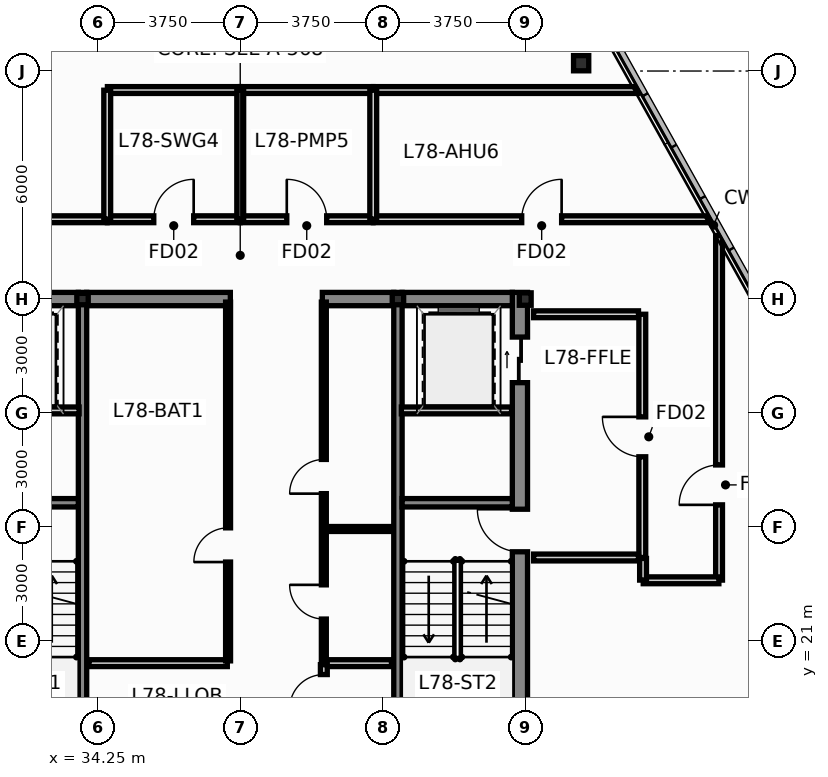
"""IFC4 building model, lengths in metres.
Left out: names, types, materials, properties, quantities, classifications, styles, units other than length and angle.
Written with IfcOpenShell. Run it as: python <this file> out.ifc"""

import sys

from ifc_helpers import new_model, si_unit, direction, frame, frame_2d, origin, origin_2d, place, context, subcontext, project, spatial, rectangle, hollow_rectangle, i_section, extrude, source, transform, mapped, element, fill, save


model = new_model("IFC4")
c1 = context("Model", 3, precision=1e-05, world=origin(), true_north=direction((0.0, 1.0)))
c2 = subcontext(c1, "Body", "Model", "MODEL_VIEW")
j1 = project(units=[si_unit("LENGTHUNIT", "METRE"), si_unit("PLANEANGLEUNIT", "RADIAN")], contexts=[c1])
p1 = place(None, origin())
s1 = spatial("IfcSite", under=j1, at=p1, CompositionType="ELEMENT")
p2 = place(p1, origin())
s2 = spatial("IfcBuilding", under=s1, at=p2, CompositionType="ELEMENT")
p3 = place(p2, frame((0.0, 0.0, 296.6)))
s3 = spatial("IfcBuildingStorey", under=s2, at=p3, CompositionType="ELEMENT", Elevation=296.6)
m1 = source(origin(), c2, "Body", "SweptSolid", [
    extrude(i_section(OverallWidth=0.311, OverallDepth=0.327, WebThickness=0.016, FlangeThickness=0.025, at=origin_2d()), origin(), (0.0, 0.0, 1.0), 3.4),
])
p4 = place(p3, frame((45.5, 30.0, 0.0), z_axis=(0.0, 0.0, 1.0), x_axis=(1.0, 0.0, 0.0)))
e1 = element("IfcColumn", 1, at=p4, inside=s3, PredefinedType="COLUMN", context=c2, shape_type="MappedRepresentation", body=[
    mapped(m1, transform((0.0, 0.0, 0.0), scale=1.0)),
])
m2 = source(origin(), c2, "Body", "SweptSolid", [
    extrude(hollow_rectangle(XDim=0.3, YDim=0.3, WallThickness=0.012, at=origin_2d()), origin(), (0.0, 0.0, 1.0), 3.4),
])
for number, where, z_axis, x_axis in (
    (2, (33.85, 30.0, 0.0), (0.0, 0.0, 1.0), (1.0, 0.0, 0.0)),
    (3, (42.15, 30.0, 0.0), (0.0, 0.0, 1.0), (1.0, 0.0, 0.0)),
):
    element("IfcColumn", number, at=place(p3, frame(where, z_axis=z_axis, x_axis=x_axis)), inside=s3, PredefinedType="COLUMN", context=c2, shape_type="MappedRepresentation", body=[
        mapped(m2, transform((0.0, 0.0, 0.0), scale=1.0)),
    ])
p5 = place(p3, frame((45.36, 17.05, 0.0), z_axis=(0.0, 0.0, 1.0), x_axis=(0.0, 1.0, 0.0)))
e4 = element("IfcWall", 4, at=p5, inside=s3, PredefinedType="SHEAR", context=c2, shape_type="SweptSolid", body=[
    extrude(rectangle(XDim=13.125, YDim=0.4, at=frame_2d((6.562, 0.0))), origin(), (0.0, 0.0, 1.0), 3.4),
])
p6 = place(p5, frame((6.3, 0.0, 0.0)))
e5 = element("IfcOpeningElement", 5, at=p6, cuts=e4, PredefinedType="OPENING", context=c2, shape_type="SweptSolid", body=[
    extrude(rectangle(XDim=1.12, YDim=2.15, at=frame_2d((0.56, 1.075))), frame((0.0, 0.212, 0.0), z_axis=(0.0, -1.0, 0.0), x_axis=(1.0, 0.0, 0.0)), (0.0, 0.0, 1.0), 0.424),
])
p7 = place(p5, frame((10.75, 0.0, 0.0)))
e6 = element("IfcOpeningElement", 6, at=p7, cuts=e4, PredefinedType="OPENING", context=c2, shape_type="SweptSolid", body=[
    extrude(rectangle(XDim=1.2, YDim=2.2, at=frame_2d((0.6, 1.1))), frame((0.0, 0.212, 0.0), z_axis=(0.0, -1.0, 0.0), x_axis=(1.0, 0.0, 0.0)), (0.0, 0.0, 1.0), 0.424),
])
p8 = place(p3, frame((30.84, 30.0, 0.0), z_axis=(0.0, 0.0, 1.0), x_axis=(1.0, 0.0, 0.0)))
e7 = element("IfcWall", 7, at=p8, inside=s3, PredefinedType="SHEAR", context=c2, shape_type="SweptSolid", body=[
    extrude(rectangle(XDim=2.9, YDim=0.35, at=frame_2d((1.45, 0.0))), origin(), (0.0, 0.0, 1.0), 3.4),
])
p9 = place(p3, frame((33.96, 30.0, 0.0), z_axis=(0.0, 0.0, 1.0), x_axis=(1.0, 0.0, 0.0)))
e8 = element("IfcWall", 8, at=p9, inside=s3, PredefinedType="SHEAR", context=c2, shape_type="SweptSolid", body=[
    extrude(rectangle(XDim=3.78, YDim=0.35, at=frame_2d((1.89, 0.0))), origin(), (0.0, 0.0, 1.0), 3.4),
])
p10 = place(p3, frame((40.16, 30.0, 0.0), z_axis=(0.0, 0.0, 1.0), x_axis=(1.0, 0.0, 0.0)))
e9 = element("IfcWall", 9, at=p10, inside=s3, PredefinedType="SHEAR", context=c2, shape_type="SweptSolid", body=[
    extrude(rectangle(XDim=1.88, YDim=0.35, at=frame_2d((0.94, 0.0))), origin(), (0.0, 0.0, 1.0), 3.4),
])
p11 = place(p3, frame((42.26, 30.0, 0.0), z_axis=(0.0, 0.0, 1.0), x_axis=(1.0, 0.0, 0.0)))
e10 = element("IfcWall", 10, at=p11, inside=s3, PredefinedType="SHEAR", context=c2, shape_type="SweptSolid", body=[
    extrude(rectangle(XDim=2.9, YDim=0.35, at=frame_2d((1.45, 0.0))), origin(), (0.0, 0.0, 1.0), 3.4),
])
for number, where, z_axis, x_axis in (
    (11, (33.85, 17.05, 0.0), (0.0, 0.0, 1.0), (0.0, 1.0, 0.0)),
    (12, (42.15, 17.05, 0.0), (0.0, 0.0, 1.0), (0.0, 1.0, 0.0)),
):
    element("IfcWall", number, at=place(p3, frame(where, z_axis=z_axis, x_axis=x_axis)), inside=s3, PredefinedType="SHEAR", context=c2, shape_type="SweptSolid", body=[
        extrude(rectangle(XDim=13.125, YDim=0.22, at=frame_2d((6.562, 0.0))), origin(), (0.0, 0.0, 1.0), 3.4),
    ])
for number, where, z_axis, x_axis in (
    (13, (30.84, 24.64, 0.0), (0.0, 0.0, 1.0), (1.0, 0.0, 0.0)),
    (14, (42.26, 24.64, 0.0), (0.0, 0.0, 1.0), (1.0, 0.0, 0.0)),
):
    element("IfcWall", number, at=place(p3, frame(where, z_axis=z_axis, x_axis=x_axis)), inside=s3, PredefinedType="SHEAR", context=c2, shape_type="SweptSolid", body=[
        extrude(rectangle(XDim=2.9, YDim=0.22, at=frame_2d((1.45, 0.0))), origin(), (0.0, 0.0, 1.0), 3.4),
    ])
m3 = source(origin(), c2, "Body", "SweptSolid", [
    extrude(hollow_rectangle(XDim=0.4, YDim=0.4, WallThickness=0.016, at=origin_2d()), origin(), (0.0, 0.0, 1.0), 3.401),
])
p12 = place(p3, frame((46.971, 36.206, 0.0), z_axis=(-0.019384199241, -0.006030639764, 0.999793920868), x_axis=(0.297066552636, -0.954856776331, 0.0)))
e15 = element("IfcColumn", 15, at=p12, inside=s3, PredefinedType="COLUMN", context=c2, shape_type="MappedRepresentation", body=[
    mapped(m3, transform((0.0, 0.0, 0.0), scale=1.0)),
])
p13 = place(p3, frame((48.58, 23.2, 0.0), z_axis=(0.0, 0.0, 1.0), x_axis=(0.0, 1.0, 0.0)))
e16 = element("IfcWall", 16, at=p13, inside=s3, PredefinedType="PARTITIONING", context=c2, shape_type="SweptSolid", body=[
    extrude(rectangle(XDim=6.4, YDim=0.18, at=frame_2d((3.2, 0.0))), origin(), (0.0, 0.0, 1.0), 2.879),
])
p14 = place(p13, frame((2.65, 0.0, 0.0)))
e17 = element("IfcOpeningElement", 17, at=p14, cuts=e16, PredefinedType="OPENING", context=c2, shape_type="SweptSolid", body=[
    extrude(rectangle(XDim=1.05, YDim=2.15, at=frame_2d((0.525, 1.075))), frame((0.0, 0.102, 0.0), z_axis=(0.0, -1.0, 0.0), x_axis=(1.0, 0.0, 0.0)), (0.0, 0.0, 1.0), 0.204),
])
for number, where, z_axis, x_axis in (
    (18, (45.72, 23.2, 0.0), (0.0, 0.0, 1.0), (1.0, 0.0, 0.0)),
    (19, (45.72, 29.6, 0.0), (0.0, 0.0, 1.0), (1.0, 0.0, 0.0)),
):
    element("IfcWall", number, at=place(p3, frame(where, z_axis=z_axis, x_axis=x_axis)), inside=s3, PredefinedType="PARTITIONING", context=c2, shape_type="SweptSolid", body=[
        extrude(rectangle(XDim=2.76, YDim=0.18, at=frame_2d((1.38, 0.0))), origin(), (0.0, 0.0, 1.0), 3.15),
    ])
for number, where, z_axis, x_axis in (
    (20, (30.86, 27.07, 0.0), (0.0, 0.0, 1.0), (1.0, 0.0, 0.0)),
    (21, (42.24, 27.07, 0.0), (0.0, 0.0, 1.0), (1.0, 0.0, 0.0)),
):
    element("IfcWall", number, at=place(p3, frame(where, z_axis=z_axis, x_axis=x_axis)), inside=s3, PredefinedType="PARTITIONING", context=c2, shape_type="SweptSolid", body=[
        extrude(rectangle(XDim=2.9, YDim=0.18, at=frame_2d((1.45, 0.0))), origin(), (0.0, 0.0, 1.0), 3.15),
    ])
p15 = place(p3, frame((34.02, 20.42, 0.0), z_axis=(0.0, 0.0, 1.0), x_axis=(1.0, 0.0, 0.0)))
e22 = element("IfcWall", 22, at=p15, inside=s3, PredefinedType="PARTITIONING", context=c2, shape_type="SweptSolid", body=[
    extrude(rectangle(XDim=3.64, YDim=0.18, at=frame_2d((1.82, 0.0))), origin(), (0.0, 0.0, 1.0), 3.15),
])
p16 = place(p3, frame((40.22, 20.42, 0.0), z_axis=(0.0, 0.0, 1.0), x_axis=(1.0, 0.0, 0.0)))
e23 = element("IfcWall", 23, at=p16, inside=s3, PredefinedType="PARTITIONING", context=c2, shape_type="SweptSolid", body=[
    extrude(rectangle(XDim=1.76, YDim=0.18, at=frame_2d((0.88, 0.0))), origin(), (0.0, 0.0, 1.0), 3.15),
])
p17 = place(p3, frame((40.28, 23.95, 0.0), z_axis=(0.0, 0.0, 1.0), x_axis=(1.0, 0.0, 0.0)))
e24 = element("IfcWall", 24, at=p17, inside=s3, PredefinedType="PARTITIONING", context=c2, shape_type="SweptSolid", body=[
    extrude(rectangle(XDim=1.7, YDim=0.13, at=frame_2d((0.85, 0.0))), origin(), (0.0, 0.0, 1.0), 3.15),
])
p18 = place(p3, frame((37.68, 20.48, 0.0), z_axis=(0.0, 0.0, 1.0), x_axis=(0.0, 1.0, 0.0)))
e25 = element("IfcWall", 25, at=p18, inside=s3, PredefinedType="PARTITIONING", context=c2, shape_type="SweptSolid", body=[
    extrude(rectangle(XDim=9.44, YDim=0.13, at=frame_2d((4.72, 0.0))), origin(), (0.0, 0.0, 1.0), 3.15),
])
p19 = place(p18, frame((2.6, 0.0, 0.0)))
e26 = element("IfcOpeningElement", 26, at=p19, cuts=e25, PredefinedType="OPENING", context=c2, shape_type="SweptSolid", body=[
    extrude(rectangle(XDim=0.9, YDim=2.1, at=frame_2d((0.45, 1.05))), frame((0.0, 0.077, 0.0), z_axis=(0.0, -1.0, 0.0), x_axis=(1.0, 0.0, 0.0)), (0.0, 0.0, 1.0), 0.154),
])
p20 = place(p3, frame((40.2, 20.48, 0.0), z_axis=(0.0, 0.0, 1.0), x_axis=(0.0, 1.0, 0.0)))
e27 = element("IfcWall", 27, at=p20, inside=s3, PredefinedType="PARTITIONING", context=c2, shape_type="SweptSolid", body=[
    extrude(rectangle(XDim=9.44, YDim=0.13, at=frame_2d((4.72, 0.0))), origin(), (0.0, 0.0, 1.0), 3.15),
])
p21 = place(p20, frame((1.1, 0.0, 0.0)))
e28 = element("IfcOpeningElement", 28, at=p21, cuts=e27, PredefinedType="OPENING", context=c2, shape_type="SweptSolid", body=[
    extrude(rectangle(XDim=0.9, YDim=2.1, at=frame_2d((0.45, 1.05))), frame((0.0, 0.077, 0.0), z_axis=(0.0, -1.0, 0.0), x_axis=(1.0, 0.0, 0.0)), (0.0, 0.0, 1.0), 0.154),
])
p22 = place(p20, frame((4.4, 0.0, 0.0)))
e29 = element("IfcOpeningElement", 29, at=p22, cuts=e27, PredefinedType="OPENING", context=c2, shape_type="SweptSolid", body=[
    extrude(rectangle(XDim=0.9, YDim=2.1, at=frame_2d((0.45, 1.05))), frame((0.0, 0.077, 0.0), z_axis=(0.0, -1.0, 0.0), x_axis=(1.0, 0.0, 0.0)), (0.0, 0.0, 1.0), 0.154),
])
p23 = place(p3, frame((40.2, 17.68, 0.0), z_axis=(0.0, 0.0, 1.0), x_axis=(0.0, 1.0, 0.0)))
e30 = element("IfcWall", 30, at=p23, inside=s3, PredefinedType="PARTITIONING", context=c2, shape_type="SweptSolid", body=[
    extrude(rectangle(XDim=2.7, YDim=0.18, at=frame_2d((1.35, 0.0))), origin(), (0.0, 0.0, 1.0), 3.15),
])
p24 = place(p23, frame((0.22, 0.0, 0.0)))
e31 = element("IfcOpeningElement", 31, at=p24, cuts=e30, PredefinedType="OPENING", context=c2, shape_type="SweptSolid", body=[
    extrude(rectangle(XDim=0.9, YDim=2.1, at=frame_2d((0.45, 1.05))), frame((0.0, 0.102, 0.0), z_axis=(0.0, -1.0, 0.0), x_axis=(1.0, 0.0, 0.0)), (0.0, 0.0, 1.0), 0.204),
])
p25 = place(p23, frame((1.54, 0.0, 0.0)))
e32 = element("IfcOpeningElement", 32, at=p25, cuts=e30, PredefinedType="OPENING", context=c2, shape_type="SweptSolid", body=[
    extrude(rectangle(XDim=0.9, YDim=2.1, at=frame_2d((0.45, 1.05))), frame((0.0, 0.102, 0.0), z_axis=(0.0, -1.0, 0.0), x_axis=(1.0, 0.0, 0.0)), (0.0, 0.0, 1.0), 0.204),
])
p26 = place(p3, frame((24.914, 32.1, 0.0), z_axis=(0.0, 0.0, 1.0), x_axis=(1.0, 0.0, 0.0)))
e33 = element("IfcWall", 33, at=p26, inside=s3, PredefinedType="PARTITIONING", context=c2, shape_type="SweptSolid", body=[
    extrude(rectangle(XDim=9.581, YDim=0.18, at=frame_2d((4.791, 0.0))), origin(), (0.0, 0.0, 1.0), 3.15),
])
p27 = place(p3, frame((50.6, 22.605, 0.0), z_axis=(0.0, 0.0, 1.0), x_axis=(0.0, 1.0, 0.0)))
e34 = element("IfcWall", 34, at=p27, inside=s3, PredefinedType="PARTITIONING", context=c2, shape_type="SweptSolid", body=[
    extrude(rectangle(XDim=9.065, YDim=0.18, at=frame_2d((4.532, 0.0))), origin(), (0.0, 0.0, 1.0), 2.879),
])
p28 = place(p27, frame((1.98, 0.0, 0.0)))
e35 = element("IfcOpeningElement", 35, at=p28, cuts=e34, PredefinedType="OPENING", context=c2, shape_type="SweptSolid", body=[
    extrude(rectangle(XDim=1.05, YDim=2.15, at=frame_2d((0.525, 1.075))), frame((0.0, 0.102, 0.0), z_axis=(0.0, -1.0, 0.0), x_axis=(1.0, 0.0, 0.0)), (0.0, 0.0, 1.0), 0.204),
])
p29 = place(p3, frame((41.505, 32.1, 0.0), z_axis=(0.0, 0.0, 1.0), x_axis=(1.0, 0.0, 0.0)))
e36 = element("IfcWall", 36, at=p29, inside=s3, PredefinedType="PARTITIONING", context=c2, shape_type="SweptSolid", body=[
    extrude(rectangle(XDim=8.855, YDim=0.18, at=frame_2d((4.428, 0.0))), origin(), (0.0, 0.0, 1.0), 3.15),
])
p30 = place(p29, frame((3.902, 0.0, 0.0)))
e37 = element("IfcOpeningElement", 37, at=p30, cuts=e36, PredefinedType="OPENING", context=c2, shape_type="SweptSolid", body=[
    extrude(rectangle(XDim=1.05, YDim=2.15, at=frame_2d((0.525, 1.075))), frame((0.0, 0.102, 0.0), z_axis=(0.0, -1.0, 0.0), x_axis=(1.0, 0.0, 0.0)), (0.0, 0.0, 1.0), 0.204),
])
p31 = place(p3, frame((41.505, 35.5, 0.0), z_axis=(0.0, 0.0, 1.0), x_axis=(1.0, 0.0, 0.0)))
e38 = element("IfcWall", 38, at=p31, inside=s3, PredefinedType="PARTITIONING", context=c2, shape_type="SweptSolid", body=[
    extrude(rectangle(XDim=6.955, YDim=0.18, at=frame_2d((3.478, 0.0))), origin(), (0.0, 0.0, 1.0), 2.879),
])
p32 = place(p3, frame((34.505, 32.1, 0.0), z_axis=(0.0, 0.0, 1.0), x_axis=(1.0, 0.0, 0.0)))
e39 = element("IfcWall", 39, at=p32, inside=s3, PredefinedType="PARTITIONING", context=c2, shape_type="SweptSolid", body=[
    extrude(rectangle(XDim=3.49, YDim=0.18, at=frame_2d((1.745, 0.0))), origin(), (0.0, 0.0, 1.0), 3.15),
])
p33 = place(p32, frame((1.22, 0.0, 0.0)))
e40 = element("IfcOpeningElement", 40, at=p33, cuts=e39, PredefinedType="OPENING", context=c2, shape_type="SweptSolid", body=[
    extrude(rectangle(XDim=1.05, YDim=2.15, at=frame_2d((0.525, 1.075))), frame((0.0, 0.102, 0.0), z_axis=(0.0, -1.0, 0.0), x_axis=(1.0, 0.0, 0.0)), (0.0, 0.0, 1.0), 0.204),
])
p34 = place(p3, frame((38.005, 32.1, 0.0), z_axis=(0.0, 0.0, 1.0), x_axis=(1.0, 0.0, 0.0)))
e41 = element("IfcWall", 41, at=p34, inside=s3, PredefinedType="PARTITIONING", context=c2, shape_type="SweptSolid", body=[
    extrude(rectangle(XDim=3.49, YDim=0.18, at=frame_2d((1.745, 0.0))), origin(), (0.0, 0.0, 1.0), 3.15),
])
p35 = place(p34, frame((1.22, 0.0, 0.0)))
e42 = element("IfcOpeningElement", 42, at=p35, cuts=e41, PredefinedType="OPENING", context=c2, shape_type="SweptSolid", body=[
    extrude(rectangle(XDim=1.05, YDim=2.15, at=frame_2d((0.525, 1.075))), frame((0.0, 0.102, 0.0), z_axis=(0.0, -1.0, 0.0), x_axis=(1.0, 0.0, 0.0)), (0.0, 0.0, 1.0), 0.204),
])
for number, where, z_axis, x_axis in (
    (43, (38.005, 35.5, 0.0), (0.0, 0.0, 1.0), (1.0, 0.0, 0.0)),
    (44, (34.505, 35.5, 0.0), (0.0, 0.0, 1.0), (1.0, 0.0, 0.0)),
):
    element("IfcWall", number, at=place(p3, frame(where, z_axis=z_axis, x_axis=x_axis)), inside=s3, PredefinedType="PARTITIONING", context=c2, shape_type="SweptSolid", body=[
        extrude(rectangle(XDim=3.49, YDim=0.18, at=frame_2d((1.745, 0.0))), origin(), (0.0, 0.0, 1.0), 2.879),
    ])
for number, where, z_axis, x_axis in (
    (45, (34.5, 32.105, 0.0), (0.0, 0.0, 1.0), (0.0, 1.0, 0.0)),
    (46, (38.0, 32.105, 0.0), (0.0, 0.0, 1.0), (0.0, 1.0, 0.0)),
    (47, (41.5, 32.105, 0.0), (0.0, 0.0, 1.0), (0.0, 1.0, 0.0)),
):
    element("IfcWall", number, at=place(p3, frame(where, z_axis=z_axis, x_axis=x_axis)), inside=s3, PredefinedType="PARTITIONING", context=c2, shape_type="SweptSolid", body=[
        extrude(rectangle(XDim=3.39, YDim=0.18, at=frame_2d((1.695, 0.0))), origin(), (0.0, 0.0, 1.0), 3.15),
    ])
p36 = place(p3, frame((48.605, 22.6, 0.0), z_axis=(0.0, 0.0, 1.0), x_axis=(1.0, 0.0, 0.0)))
e48 = element("IfcWall", 48, at=p36, inside=s3, PredefinedType="PARTITIONING", context=c2, shape_type="SweptSolid", body=[
    extrude(rectangle(XDim=1.99, YDim=0.18, at=frame_2d((0.995, 0.0))), origin(), (0.0, 0.0, 1.0), 3.15),
])
p37 = place(p3, frame((48.6, 23.175, 0.0), z_axis=(0.0, 0.0, 1.0), x_axis=(0.0, -1.0, 0.0)))
e49 = element("IfcWall", 49, at=p37, inside=s3, PredefinedType="PARTITIONING", context=c2, shape_type="SweptSolid", body=[
    extrude(rectangle(XDim=0.57, YDim=0.18, at=frame_2d((0.285, 0.0))), origin(), (0.0, 0.0, 1.0), 2.879),
])
p38 = place(p6, origin())
e50 = element("IfcDoor", 50, at=p38, inside=s3, OperationType="SINGLE_SWING_RIGHT", PredefinedType="DOOR", context=c2, shape_type="SweptSolid", body=[
    extrude(rectangle(XDim=1.12, YDim=2.15, at=frame_2d((0.56, 1.075))), frame((0.0, 0.025, 0.0), z_axis=(0.0, -1.0, 0.0), x_axis=(1.0, 0.0, 0.0)), (0.0, 0.0, 1.0), 0.05),
])
fill(e5, e50)
p39 = place(p7, origin())
e51 = element("IfcDoor", 51, at=p39, inside=s3, OperationType="SLIDING_TO_RIGHT", PredefinedType="DOOR", context=c2, shape_type="SweptSolid", body=[
    extrude(rectangle(XDim=1.2, YDim=2.2, at=frame_2d((0.6, 1.1))), frame((0.0, 0.025, 0.0), z_axis=(0.0, -1.0, 0.0), x_axis=(1.0, 0.0, 0.0)), (0.0, 0.0, 1.0), 0.05),
])
fill(e6, e51)
p40 = place(p14, origin())
e52 = element("IfcDoor", 52, at=p40, inside=s3, OperationType="SINGLE_SWING_RIGHT", PredefinedType="DOOR", context=c2, shape_type="SweptSolid", body=[
    extrude(rectangle(XDim=1.05, YDim=2.15, at=frame_2d((0.525, 1.075))), frame((0.0, 0.025, 0.0), z_axis=(0.0, -1.0, 0.0), x_axis=(1.0, 0.0, 0.0)), (0.0, 0.0, 1.0), 0.05),
])
fill(e17, e52)
p41 = place(p19, origin())
e53 = element("IfcDoor", 53, at=p41, inside=s3, OperationType="SINGLE_SWING_LEFT", PredefinedType="DOOR", context=c2, shape_type="SweptSolid", body=[
    extrude(rectangle(XDim=0.9, YDim=2.1, at=frame_2d((0.45, 1.05))), frame((0.0, 0.025, 0.0), z_axis=(0.0, -1.0, 0.0), x_axis=(1.0, 0.0, 0.0)), (0.0, 0.0, 1.0), 0.05),
])
fill(e26, e53)
p42 = place(p21, origin())
e54 = element("IfcDoor", 54, at=p42, inside=s3, OperationType="SINGLE_SWING_RIGHT", PredefinedType="DOOR", context=c2, shape_type="SweptSolid", body=[
    extrude(rectangle(XDim=0.9, YDim=2.1, at=frame_2d((0.45, 1.05))), frame((0.0, 0.025, 0.0), z_axis=(0.0, -1.0, 0.0), x_axis=(1.0, 0.0, 0.0)), (0.0, 0.0, 1.0), 0.05),
])
fill(e28, e54)
p43 = place(p22, origin())
e55 = element("IfcDoor", 55, at=p43, inside=s3, OperationType="SINGLE_SWING_LEFT", PredefinedType="DOOR", context=c2, shape_type="SweptSolid", body=[
    extrude(rectangle(XDim=0.9, YDim=2.1, at=frame_2d((0.45, 1.05))), frame((0.0, 0.025, 0.0), z_axis=(0.0, -1.0, 0.0), x_axis=(1.0, 0.0, 0.0)), (0.0, 0.0, 1.0), 0.05),
])
fill(e29, e55)
p44 = place(p25, origin())
e56 = element("IfcDoor", 56, at=p44, inside=s3, OperationType="SINGLE_SWING_LEFT", PredefinedType="DOOR", context=c2, shape_type="SweptSolid", body=[
    extrude(rectangle(XDim=0.9, YDim=2.1, at=frame_2d((0.45, 1.05))), frame((0.0, 0.025, 0.0), z_axis=(0.0, -1.0, 0.0), x_axis=(1.0, 0.0, 0.0)), (0.0, 0.0, 1.0), 0.05),
])
fill(e32, e56)
p45 = place(p28, origin())
e57 = element("IfcDoor", 57, at=p45, inside=s3, OperationType="SINGLE_SWING_LEFT", PredefinedType="DOOR", context=c2, shape_type="SweptSolid", body=[
    extrude(rectangle(XDim=1.05, YDim=2.15, at=frame_2d((0.525, 1.075))), frame((0.0, 0.025, 0.0), z_axis=(0.0, -1.0, 0.0), x_axis=(1.0, 0.0, 0.0)), (0.0, 0.0, 1.0), 0.05),
])
fill(e35, e57)
p46 = place(p30, origin())
e58 = element("IfcDoor", 58, at=p46, inside=s3, OperationType="SINGLE_SWING_RIGHT", PredefinedType="DOOR", context=c2, shape_type="SweptSolid", body=[
    extrude(rectangle(XDim=1.05, YDim=2.15, at=frame_2d((0.525, 1.075))), frame((0.0, 0.025, 0.0), z_axis=(0.0, -1.0, 0.0), x_axis=(1.0, 0.0, 0.0)), (0.0, 0.0, 1.0), 0.05),
])
fill(e37, e58)
p47 = place(p33, origin())
e59 = element("IfcDoor", 59, at=p47, inside=s3, OperationType="SINGLE_SWING_RIGHT", PredefinedType="DOOR", context=c2, shape_type="SweptSolid", body=[
    extrude(rectangle(XDim=1.05, YDim=2.15, at=frame_2d((0.525, 1.075))), frame((0.0, 0.025, 0.0), z_axis=(0.0, -1.0, 0.0), x_axis=(1.0, 0.0, 0.0)), (0.0, 0.0, 1.0), 0.05),
])
fill(e40, e59)
p48 = place(p35, origin())
e60 = element("IfcDoor", 60, at=p48, inside=s3, OperationType="SINGLE_SWING_LEFT", PredefinedType="DOOR", context=c2, shape_type="SweptSolid", body=[
    extrude(rectangle(XDim=1.05, YDim=2.15, at=frame_2d((0.525, 1.075))), frame((0.0, 0.025, 0.0), z_axis=(0.0, -1.0, 0.0), x_axis=(1.0, 0.0, 0.0)), (0.0, 0.0, 1.0), 0.05),
])
fill(e42, e60)
save(model, sys.argv[1])
